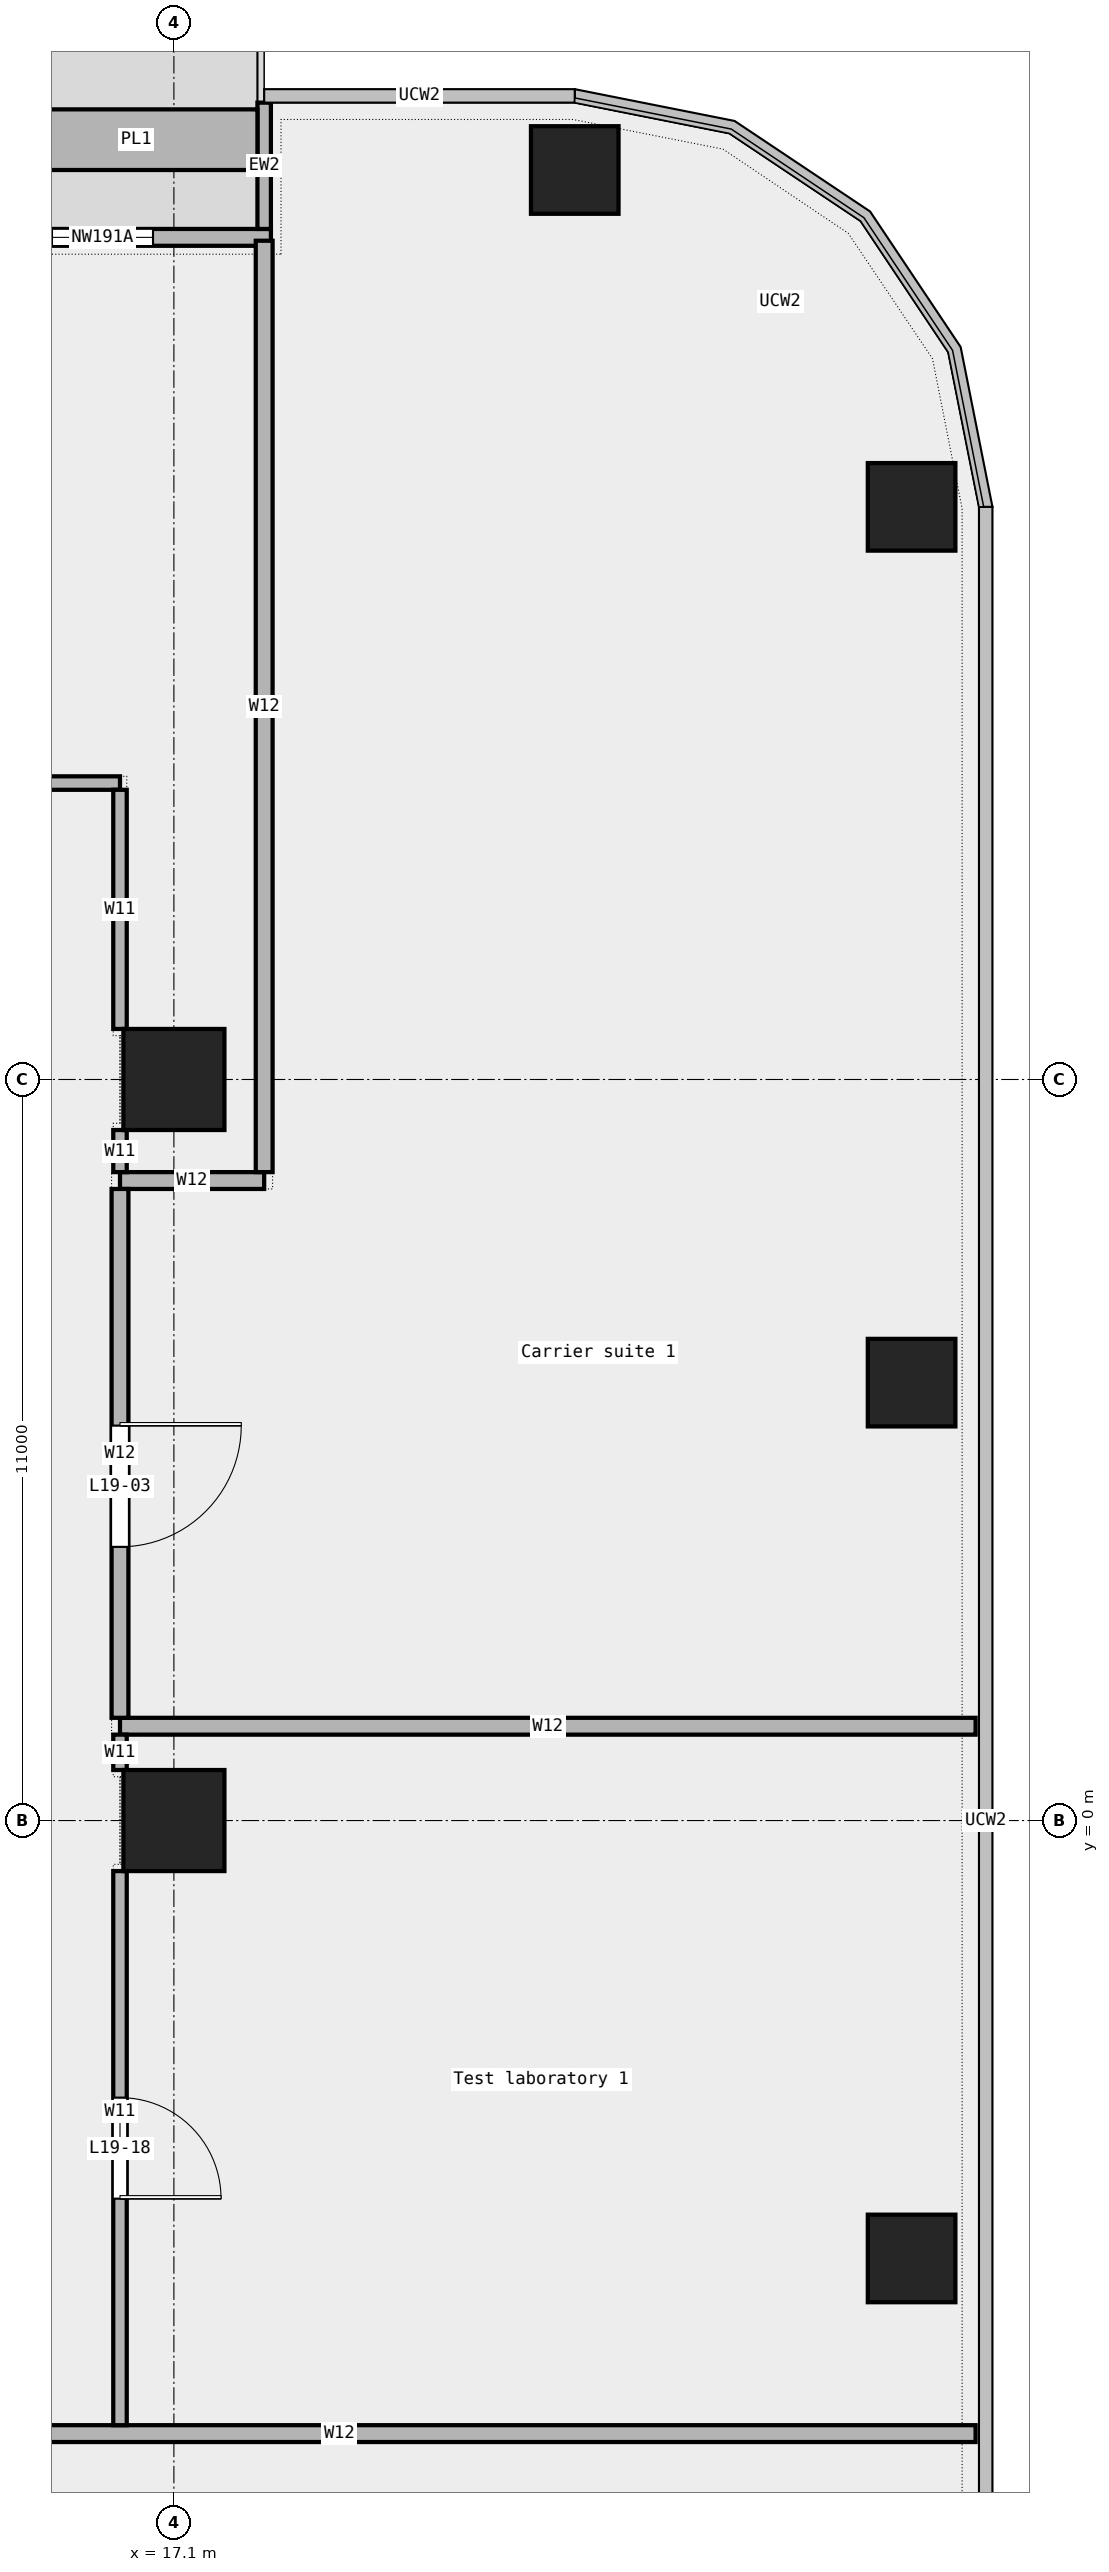
"""IFC4 building model, lengths in metres.
Left out: names, types, materials, properties, quantities, classifications, styles, units other than length and angle.
Written with IfcOpenShell. Run it as: python <this file> out.ifc"""

import sys

from ifc_helpers import new_model, si_unit, direction, frame, frame_2d, origin, origin_2d, place, context, subcontext, project, spatial, rectangle, extrude, element, fill, save


model = new_model("IFC4")
c1 = context("Model", 3, precision=1e-05, world=origin(), true_north=direction((0.0, 1.0)))
c2 = subcontext(c1, "Body", "Model", "MODEL_VIEW")
j1 = project(units=[si_unit("LENGTHUNIT", "METRE"), si_unit("PLANEANGLEUNIT", "RADIAN")], contexts=[c1])
p1 = place(None, origin())
s1 = spatial("IfcSite", under=j1, at=p1, CompositionType="ELEMENT")
p2 = place(p1, origin())
s2 = spatial("IfcBuilding", under=s1, at=p2, CompositionType="ELEMENT")
p3 = place(p2, frame((0.0, 0.0, 99.1)))
s3 = spatial("IfcBuildingStorey", under=s2, at=p3, CompositionType="ELEMENT", Elevation=99.1)
for number, where, z_axis, x_axis in (
    (1, (28.05, -6.5, 0.0), (0.0, 0.0, 1.0), (1.0, 0.0, 0.0)),
    (2, (28.05, 6.5, 0.0), (0.0, 0.0, 1.0), (1.0, 0.0, 0.0)),
    (3, (28.05, 19.5, 0.0), (0.0, 0.0, 1.0), (1.0, 0.0, 0.0)),
    (4, (23.05, 24.5, 0.0), (0.0, 0.0, 1.0), (1.0, 0.0, 0.0)),
):
    element("IfcColumn", number, at=place(p3, frame(where, z_axis=z_axis, x_axis=x_axis)), inside=s3, PredefinedType="COLUMN", context=c2, shape_type="SweptSolid", body=[
        extrude(rectangle(XDim=1.3, YDim=1.3, at=origin_2d()), origin(), (0.0, 0.0, 1.0), 4.05),
    ])
for number, where, z_axis, x_axis in (
    (5, (17.1, 0.0, 0.0), (0.0, 0.0, 1.0), (1.0, 0.0, 0.0)),
    (6, (17.1, 11.0, 0.0), (0.0, 0.0, 1.0), (1.0, 0.0, 0.0)),
):
    element("IfcColumn", number, at=place(p3, frame(where, z_axis=z_axis, x_axis=x_axis)), inside=s3, PredefinedType="COLUMN", context=c2, shape_type="SweptSolid", body=[
        extrude(rectangle(XDim=1.5, YDim=1.5, at=origin_2d()), origin(), (0.0, 0.0, 1.0), 4.05),
    ])
p4 = place(p3, frame((18.54, 23.5, 0.0), z_axis=(0.0, 0.0, 1.0), x_axis=(-1.0, 0.0, 0.0)))
e7 = element("IfcWall", 7, at=p4, inside=s3, PredefinedType="STANDARD", context=c2, shape_type="SweptSolid", body=[
    extrude(rectangle(XDim=14.03, YDim=0.25, at=frame_2d((7.015, 0.0))), origin(), (0.0, 0.0, 1.0), 4.05),
])
p5 = place(p4, frame((1.75, 0.0, 0.45)))
e8 = element("IfcOpeningElement", 8, at=p5, cuts=e7, PredefinedType="OPENING", context=c2, shape_type="SweptSolid", body=[
    extrude(rectangle(XDim=1.5, YDim=3.0, at=frame_2d((0.75, 1.5))), frame((0.0, 0.137, 0.0), z_axis=(0.0, -1.0, 0.0), x_axis=(1.0, 0.0, 0.0)), (0.0, 0.0, 1.0), 0.274),
])
p6 = place(p4, frame((4.25, 0.0, 0.0)))
e9 = element("IfcOpeningElement", 9, at=p6, cuts=e7, PredefinedType="OPENING", context=c2, shape_type="SweptSolid", body=[
    extrude(rectangle(XDim=1.8, YDim=2.4, at=frame_2d((0.9, 1.2))), frame((0.0, 0.137, 0.0), z_axis=(0.0, -1.0, 0.0), x_axis=(1.0, 0.0, 0.0)), (0.0, 0.0, 1.0), 0.274),
])
p7 = place(p4, frame((10.75, 0.0, 0.45)))
e10 = element("IfcOpeningElement", 10, at=p7, cuts=e7, PredefinedType="OPENING", context=c2, shape_type="SweptSolid", body=[
    extrude(rectangle(XDim=1.5, YDim=3.0, at=frame_2d((0.75, 1.5))), frame((0.0, 0.137, 0.0), z_axis=(0.0, -1.0, 0.0), x_axis=(1.0, 0.0, 0.0)), (0.0, 0.0, 1.0), 0.274),
])
p8 = place(p3, frame((18.44, 25.5, 0.0), z_axis=(0.0, 0.0, 1.0), x_axis=(0.0, -1.0, 0.0)))
e11 = element("IfcWall", 11, at=p8, inside=s3, PredefinedType="STANDARD", context=c2, shape_type="SweptSolid", body=[
    extrude(rectangle(XDim=1.875, YDim=0.2, at=frame_2d((0.938, 0.0))), origin(), (0.0, 0.0, 1.0), 4.05),
])
p9 = place(p3, frame((18.34, 24.95, 0.0), z_axis=(0.0, 0.0, 1.0), x_axis=(-1.0, 0.0, 0.0)))
e12 = element("IfcWall", 12, at=p9, inside=s3, PredefinedType="STANDARD", context=c2, shape_type="SweptSolid", body=[
    extrude(rectangle(XDim=3.6, YDim=0.9, at=frame_2d((1.8, 0.0))), origin(), (0.0, 0.0, 1.0), 0.7),
])
p10 = place(p3, frame((10.115, -9.1, 0.0), z_axis=(0.0, 0.0, 1.0), x_axis=(1.0, 0.0, 0.0)))
e13 = element("IfcWall", 13, at=p10, inside=s3, PredefinedType="PARTITIONING", context=c2, shape_type="SweptSolid", body=[
    extrude(rectangle(XDim=18.885, YDim=0.25, at=frame_2d((9.442, 0.0))), origin(), (0.0, 0.0, 1.0), 4.05),
])
p11 = place(p3, frame((16.3, 1.4, 0.0), z_axis=(0.0, 0.0, 1.0), x_axis=(1.0, 0.0, 0.0)))
e14 = element("IfcWall", 14, at=p11, inside=s3, PredefinedType="PARTITIONING", context=c2, shape_type="SweptSolid", body=[
    extrude(rectangle(XDim=12.7, YDim=0.25, at=frame_2d((6.35, 0.0))), origin(), (0.0, 0.0, 1.0), 4.05),
])
p12 = place(p3, frame((16.3, 9.5, 0.0), z_axis=(0.0, 0.0, 1.0), x_axis=(1.0, 0.0, 0.0)))
e15 = element("IfcWall", 15, at=p12, inside=s3, PredefinedType="PARTITIONING", context=c2, shape_type="SweptSolid", body=[
    extrude(rectangle(XDim=2.14, YDim=0.25, at=frame_2d((1.07, 0.0))), origin(), (0.0, 0.0, 1.0), 4.05),
])
p13 = place(p3, frame((1.0, 15.4, 0.0), z_axis=(0.0, 0.0, 1.0), x_axis=(1.0, 0.0, 0.0)))
e16 = element("IfcWall", 16, at=p13, inside=s3, PredefinedType="PARTITIONING", context=c2, shape_type="SweptSolid", body=[
    extrude(rectangle(XDim=15.3, YDim=0.2, at=frame_2d((7.65, 0.0))), origin(), (0.0, 0.0, 1.0), 4.05),
])
p14 = place(p13, frame((1.355, 0.0, 0.0)))
e17 = element("IfcOpeningElement", 17, at=p14, cuts=e16, PredefinedType="OPENING", context=c2, shape_type="SweptSolid", body=[
    extrude(rectangle(XDim=0.9, YDim=2.1, at=frame_2d((0.45, 1.05))), frame((0.0, 0.112, 0.0), z_axis=(0.0, -1.0, 0.0), x_axis=(1.0, 0.0, 0.0)), (0.0, 0.0, 1.0), 0.224),
])
p15 = place(p13, frame((8.705, 0.0, 0.0)))
e18 = element("IfcOpeningElement", 18, at=p15, cuts=e16, PredefinedType="OPENING", context=c2, shape_type="SweptSolid", body=[
    extrude(rectangle(XDim=1.5, YDim=2.1, at=frame_2d((0.75, 1.05))), frame((0.0, 0.112, 0.0), z_axis=(0.0, -1.0, 0.0), x_axis=(1.0, 0.0, 0.0)), (0.0, 0.0, 1.0), 0.224),
])
p16 = place(p3, frame((16.3, -8.975, 0.0), z_axis=(0.0, 0.0, 1.0), x_axis=(0.0, 1.0, 0.0)))
e19 = element("IfcWall", 19, at=p16, inside=s3, PredefinedType="PARTITIONING", context=c2, shape_type="SweptSolid", body=[
    extrude(rectangle(XDim=8.225, YDim=0.2, at=frame_2d((4.113, 0.0))), origin(), (0.0, 0.0, 1.0), 4.05),
])
p17 = place(p16, frame((3.363, 0.0, 0.0)))
e20 = element("IfcOpeningElement", 20, at=p17, cuts=e19, PredefinedType="OPENING", context=c2, shape_type="SweptSolid", body=[
    extrude(rectangle(XDim=1.5, YDim=2.1, at=frame_2d((0.75, 1.05))), frame((0.0, 0.112, 0.0), z_axis=(0.0, -1.0, 0.0), x_axis=(1.0, 0.0, 0.0)), (0.0, 0.0, 1.0), 0.224),
])
p18 = place(p3, frame((16.3, 0.75, 0.0), z_axis=(0.0, 0.0, 1.0), x_axis=(0.0, 1.0, 0.0)))
e21 = element("IfcWall", 21, at=p18, inside=s3, PredefinedType="PARTITIONING", context=c2, shape_type="SweptSolid", body=[
    extrude(rectangle(XDim=0.525, YDim=0.2, at=frame_2d((0.262, 0.0))), origin(), (0.0, 0.0, 1.0), 4.05),
])
p19 = place(p3, frame((16.3, 9.625, 0.0), z_axis=(0.0, 0.0, 1.0), x_axis=(0.0, 1.0, 0.0)))
e22 = element("IfcWall", 22, at=p19, inside=s3, PredefinedType="PARTITIONING", context=c2, shape_type="SweptSolid", body=[
    extrude(rectangle(XDim=0.625, YDim=0.2, at=frame_2d((0.312, 0.0))), origin(), (0.0, 0.0, 1.0), 4.05),
])
p20 = place(p3, frame((16.3, 11.75, 0.0), z_axis=(0.0, 0.0, 1.0), x_axis=(0.0, 1.0, 0.0)))
e23 = element("IfcWall", 23, at=p20, inside=s3, PredefinedType="PARTITIONING", context=c2, shape_type="SweptSolid", body=[
    extrude(rectangle(XDim=3.55, YDim=0.2, at=frame_2d((1.775, 0.0))), origin(), (0.0, 0.0, 1.0), 4.05),
])
p21 = place(p3, frame((16.3, 1.525, 0.0), z_axis=(0.0, 0.0, 1.0), x_axis=(0.0, 1.0, 0.0)))
e24 = element("IfcWall", 24, at=p21, inside=s3, PredefinedType="PARTITIONING", context=c2, shape_type="SweptSolid", body=[
    extrude(rectangle(XDim=7.85, YDim=0.25, at=frame_2d((3.925, 0.0))), origin(), (0.0, 0.0, 1.0), 4.05),
])
p22 = place(p21, frame((2.538, 0.0, 0.0)))
e25 = element("IfcOpeningElement", 25, at=p22, cuts=e24, PredefinedType="OPENING", context=c2, shape_type="SweptSolid", body=[
    extrude(rectangle(XDim=1.8, YDim=2.1, at=frame_2d((0.9, 1.05))), frame((0.0, 0.137, 0.0), z_axis=(0.0, -1.0, 0.0), x_axis=(1.0, 0.0, 0.0)), (0.0, 0.0, 1.0), 0.274),
])
p23 = place(p3, frame((18.44, 9.625, 0.0), z_axis=(0.0, 0.0, 1.0), x_axis=(0.0, 1.0, 0.0)))
e26 = element("IfcWall", 26, at=p23, inside=s3, PredefinedType="PARTITIONING", context=c2, shape_type="SweptSolid", body=[
    extrude(rectangle(XDim=13.825, YDim=0.25, at=frame_2d((6.913, 0.0))), origin(), (0.0, 0.0, 1.0), 4.05),
])
p24 = place(p5, origin())
e27 = element("IfcWindow", 27, at=p24, inside=s3, PartitioningType="SINGLE_PANEL", PredefinedType="WINDOW", context=c2, shape_type="SweptSolid", body=[
    extrude(rectangle(XDim=1.5, YDim=3.0, at=frame_2d((0.75, 1.5))), frame((0.0, 0.03, 0.0), z_axis=(0.0, -1.0, 0.0), x_axis=(1.0, 0.0, 0.0)), (0.0, 0.0, 1.0), 0.06),
])
fill(e8, e27)
p25 = place(p22, origin())
e28 = element("IfcDoor", 28, at=p25, inside=s3, OperationType="DOUBLE_DOOR_SINGLE_SWING", PredefinedType="DOOR", context=c2, shape_type="SweptSolid", body=[
    extrude(rectangle(XDim=1.8, YDim=2.1, at=frame_2d((0.9, 1.05))), frame((0.0, 0.025, 0.0), z_axis=(0.0, -1.0, 0.0), x_axis=(1.0, 0.0, 0.0)), (0.0, 0.0, 1.0), 0.05),
])
fill(e25, e28)
p26 = place(p17, origin())
e29 = element("IfcDoor", 29, at=p26, inside=s3, OperationType="DOUBLE_DOOR_SINGLE_SWING", PredefinedType="DOOR", context=c2, shape_type="SweptSolid", body=[
    extrude(rectangle(XDim=1.5, YDim=2.1, at=frame_2d((0.75, 1.05))), frame((0.0, 0.025, 0.0), z_axis=(0.0, -1.0, 0.0), x_axis=(1.0, 0.0, 0.0)), (0.0, 0.0, 1.0), 0.05),
])
fill(e20, e29)
save(model, sys.argv[1])
